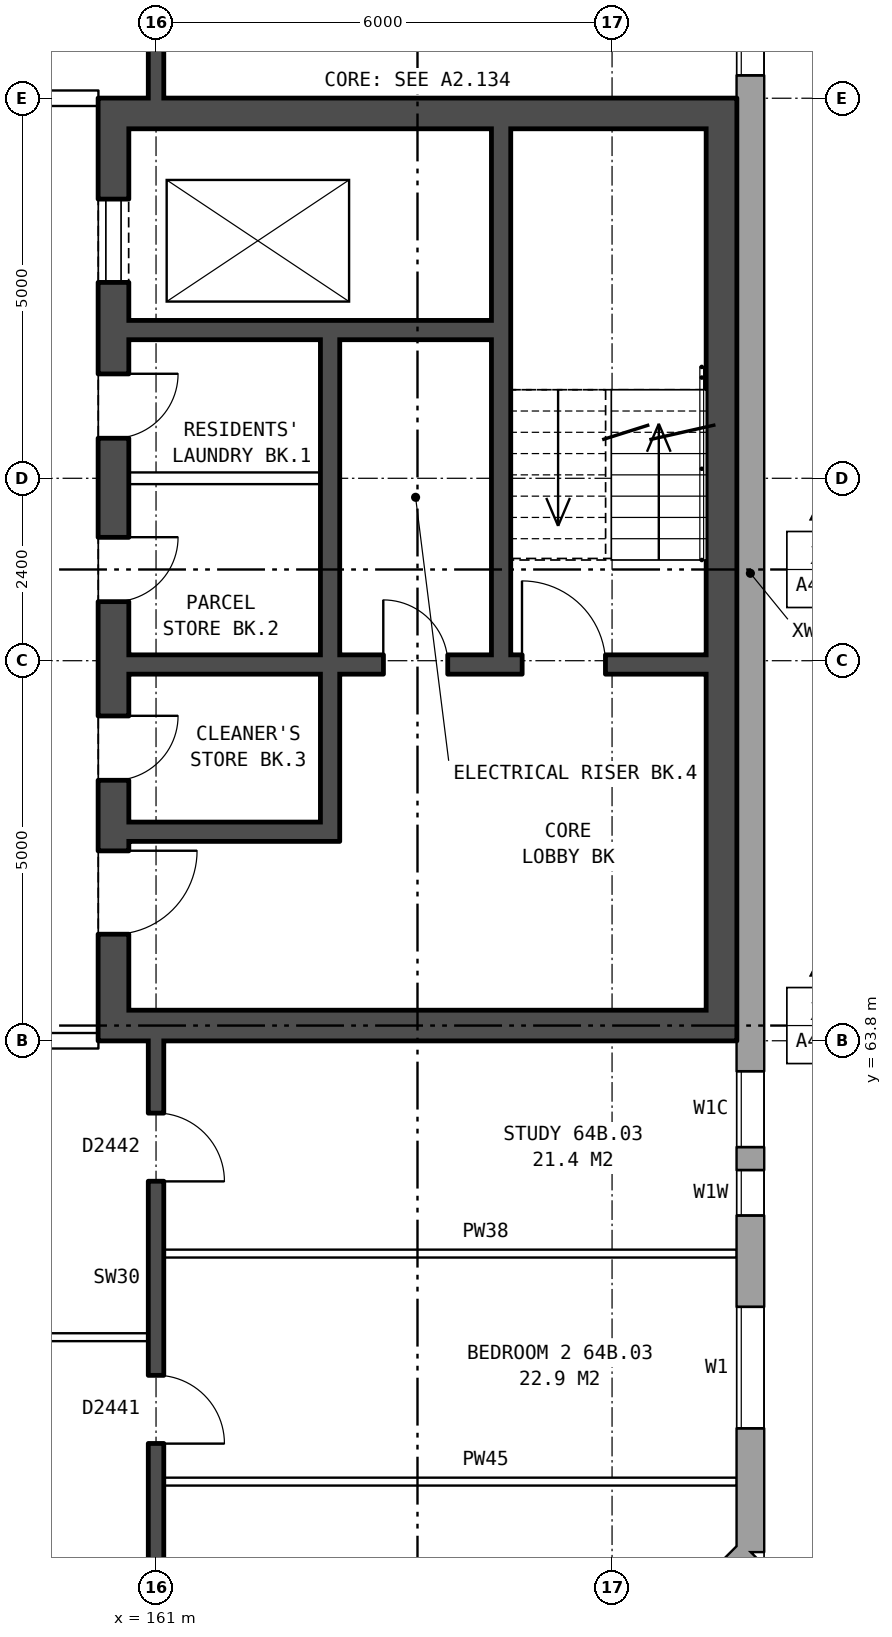
"""IFC4 building model, lengths in metres.
Left out: names, types, materials, properties, quantities, classifications, styles, units other than length and angle.
Written with IfcOpenShell. Run it as: python <this file> out.ifc"""

import sys

from ifc_helpers import new_model, si_unit, direction, frame, frame_2d, origin, place, context, subcontext, project, spatial, rectangle, extrude, element, fill, save


model = new_model("IFC4")
c1 = context("Model", 3, precision=1e-05, world=origin(), true_north=direction((0.0, 1.0)))
c2 = subcontext(c1, "Body", "Model", "MODEL_VIEW")
j1 = project(units=[si_unit("LENGTHUNIT", "METRE"), si_unit("PLANEANGLEUNIT", "RADIAN")], contexts=[c1])
p1 = place(None, origin())
s1 = spatial("IfcSite", under=j1, at=p1, CompositionType="ELEMENT")
p2 = place(p1, origin())
s2 = spatial("IfcBuilding", under=s1, at=p2, CompositionType="ELEMENT")
p3 = place(p2, frame((0.0, 0.0, 227.6)))
s3 = spatial("IfcBuildingStorey", under=s2, at=p3, CompositionType="ELEMENT", Elevation=227.6)
p4 = place(p3, frame((165.925, 54.18, 0.0), z_axis=(0.0, 0.0, 1.0), x_axis=(0.707106781187, 0.707106781187, 0.0)))
e1 = element("IfcWall", 1, at=p4, inside=s3, PredefinedType="STANDARD", context=c2, shape_type="SweptSolid", body=[
    extrude(rectangle(XDim=4.094, YDim=0.36, at=frame_2d((2.047, 0.0))), origin(), (0.0, 0.0, 1.0), 2.85),
])
p5 = place(p4, frame((1.247, 0.0, 0.8)))
e2 = element("IfcOpeningElement", 2, at=p5, cuts=e1, PredefinedType="OPENING", context=c2, shape_type="SweptSolid", body=[
    extrude(rectangle(XDim=1.6, YDim=1.8, at=frame_2d((0.8, 0.9))), frame((0.0, 0.19, 0.0), z_axis=(0.0, -1.0, 0.0), x_axis=(1.0, 0.0, 0.0)), (0.0, 0.0, 1.0), 0.38),
])
p6 = place(p3, frame((168.82, 57.075, 0.0), z_axis=(0.0, 0.0, 1.0), x_axis=(0.0, 1.0, 0.0)))
e3 = element("IfcWall", 3, at=p6, inside=s3, PredefinedType="STANDARD", context=c2, shape_type="SweptSolid", body=[
    extrude(rectangle(XDim=25.851, YDim=0.36, at=frame_2d((12.925, 0.0))), origin(), (0.0, 0.0, 1.0), 2.85),
])
p7 = place(p6, frame((1.625, 0.0, 0.8)))
e4 = element("IfcOpeningElement", 4, at=p7, cuts=e3, PredefinedType="OPENING", context=c2, shape_type="SweptSolid", body=[
    extrude(rectangle(XDim=1.6, YDim=1.8, at=frame_2d((0.8, 0.9))), frame((0.0, 0.19, 0.0), z_axis=(0.0, -1.0, 0.0), x_axis=(1.0, 0.0, 0.0)), (0.0, 0.0, 1.0), 0.38),
])
p8 = place(p6, frame((4.425, 0.0, 1.7)))
e5 = element("IfcOpeningElement", 5, at=p8, cuts=e3, PredefinedType="OPENING", context=c2, shape_type="SweptSolid", body=[
    extrude(rectangle(XDim=0.6, YDim=0.9, at=frame_2d((0.3, 0.45))), frame((0.0, 0.19, 0.0), z_axis=(0.0, -1.0, 0.0), x_axis=(1.0, 0.0, 0.0)), (0.0, 0.0, 1.0), 0.38),
])
p9 = place(p6, frame((19.425, 0.0, 0.8)))
e6 = element("IfcOpeningElement", 6, at=p9, cuts=e3, PredefinedType="OPENING", context=c2, shape_type="SweptSolid", body=[
    extrude(rectangle(XDim=1.0, YDim=1.8, at=frame_2d((0.5, 0.9))), frame((0.0, 0.19, 0.0), z_axis=(0.0, -1.0, 0.0), x_axis=(1.0, 0.0, 0.0)), (0.0, 0.0, 1.0), 0.38),
])
p10 = place(p6, frame((22.625, 0.0, 0.8)))
e7 = element("IfcOpeningElement", 7, at=p10, cuts=e3, PredefinedType="OPENING", context=c2, shape_type="SweptSolid", body=[
    extrude(rectangle(XDim=1.6, YDim=1.8, at=frame_2d((0.8, 0.9))), frame((0.0, 0.19, 0.0), z_axis=(0.0, -1.0, 0.0), x_axis=(1.0, 0.0, 0.0)), (0.0, 0.0, 1.0), 0.38),
])
p11 = place(p6, frame((5.325, 0.0, 0.8)))
e8 = element("IfcOpeningElement", 8, at=p11, cuts=e3, PredefinedType="OPENING", context=c2, shape_type="SweptSolid", body=[
    extrude(rectangle(XDim=1.0, YDim=1.8, at=frame_2d((0.5, 0.9))), frame((0.0, 0.19, 0.0), z_axis=(0.0, -1.0, 0.0), x_axis=(1.0, 0.0, 0.0)), (0.0, 0.0, 1.0), 0.38),
])
p12 = place(p6, frame((20.725, 0.0, 1.6)))
e9 = element("IfcOpeningElement", 9, at=p12, cuts=e3, PredefinedType="OPENING", context=c2, shape_type="SweptSolid", body=[
    extrude(rectangle(XDim=0.6, YDim=0.9, at=frame_2d((0.3, 0.45))), frame((0.0, 0.19, 0.0), z_axis=(0.0, -1.0, 0.0), x_axis=(1.0, 0.0, 0.0)), (0.0, 0.0, 1.0), 0.38),
])
p13 = place(p3, frame((160.44, 76.2, 0.0), z_axis=(0.0, 0.0, 1.0), x_axis=(0.0, -1.0, 0.0)))
e10 = element("IfcWall", 10, at=p13, inside=s3, PredefinedType="SHEAR", context=c2, shape_type="SweptSolid", body=[
    extrude(rectangle(XDim=12.4, YDim=0.4, at=frame_2d((6.2, 0.0))), origin(), (0.0, 0.0, 1.0), 2.85),
])
p14 = place(p13, frame((1.325, 0.0, 0.0)))
e11 = element("IfcOpeningElement", 11, at=p14, cuts=e10, PredefinedType="OPENING", context=c2, shape_type="SweptSolid", body=[
    extrude(rectangle(XDim=1.1, YDim=2.1, at=frame_2d((0.55, 1.05))), frame((0.0, 0.21, 0.0), z_axis=(0.0, -1.0, 0.0), x_axis=(1.0, 0.0, 0.0)), (0.0, 0.0, 1.0), 0.42),
])
p15 = place(p13, frame((3.625, 0.0, 0.0)))
e12 = element("IfcOpeningElement", 12, at=p15, cuts=e10, PredefinedType="OPENING", context=c2, shape_type="SweptSolid", body=[
    extrude(rectangle(XDim=0.85, YDim=2.1, at=frame_2d((0.425, 1.05))), frame((0.0, 0.21, 0.0), z_axis=(0.0, -1.0, 0.0), x_axis=(1.0, 0.0, 0.0)), (0.0, 0.0, 1.0), 0.42),
])
p16 = place(p13, frame((5.775, 0.0, 0.0)))
e13 = element("IfcOpeningElement", 13, at=p16, cuts=e10, PredefinedType="OPENING", context=c2, shape_type="SweptSolid", body=[
    extrude(rectangle(XDim=0.85, YDim=2.1, at=frame_2d((0.425, 1.05))), frame((0.0, 0.21, 0.0), z_axis=(0.0, -1.0, 0.0), x_axis=(1.0, 0.0, 0.0)), (0.0, 0.0, 1.0), 0.42),
])
p17 = place(p13, frame((9.9, 0.0, 0.0)))
e14 = element("IfcOpeningElement", 14, at=p17, cuts=e10, PredefinedType="OPENING", context=c2, shape_type="SweptSolid", body=[
    extrude(rectangle(XDim=1.1, YDim=2.1, at=frame_2d((0.55, 1.05))), frame((0.0, 0.21, 0.0), z_axis=(0.0, -1.0, 0.0), x_axis=(1.0, 0.0, 0.0)), (0.0, 0.0, 1.0), 0.42),
])
p18 = place(p13, frame((8.125, 0.0, 0.0)))
e15 = element("IfcOpeningElement", 15, at=p18, cuts=e10, PredefinedType="OPENING", context=c2, shape_type="SweptSolid", body=[
    extrude(rectangle(XDim=0.85, YDim=2.1, at=frame_2d((0.425, 1.05))), frame((0.0, 0.21, 0.0), z_axis=(0.0, -1.0, 0.0), x_axis=(1.0, 0.0, 0.0)), (0.0, 0.0, 1.0), 0.42),
])
p19 = place(p3, frame((168.44, 76.2, 0.0), z_axis=(0.0, 0.0, 1.0), x_axis=(0.0, -1.0, 0.0)))
e16 = element("IfcWall", 16, at=p19, inside=s3, PredefinedType="SHEAR", context=c2, shape_type="SweptSolid", body=[
    extrude(rectangle(XDim=12.4, YDim=0.4, at=frame_2d((6.2, 0.0))), origin(), (0.0, 0.0, 1.0), 2.85),
])
for number, where, z_axis, x_axis in (
    (17, (160.64, 76.0, 0.0), (0.0, 0.0, 1.0), (1.0, 0.0, 0.0)),
    (18, (160.64, 64.0, 0.0), (0.0, 0.0, 1.0), (1.0, 0.0, 0.0)),
):
    element("IfcWall", number, at=place(p3, frame(where, z_axis=z_axis, x_axis=x_axis)), inside=s3, PredefinedType="SHEAR", context=c2, shape_type="SweptSolid", body=[
        extrude(rectangle(XDim=7.6, YDim=0.4, at=frame_2d((3.8, 0.0))), origin(), (0.0, 0.0, 1.0), 2.85),
    ])
p20 = place(p3, frame((160.64, 73.15, 0.0), z_axis=(0.0, 0.0, 1.0), x_axis=(1.0, 0.0, 0.0)))
e19 = element("IfcWall", 19, at=p20, inside=s3, PredefinedType="SHEAR", context=c2, shape_type="SweptSolid", body=[
    extrude(rectangle(XDim=4.775, YDim=0.25, at=frame_2d((2.388, 0.0))), origin(), (0.0, 0.0, 1.0), 2.85),
])
p21 = place(p3, frame((160.64, 71.2, 0.0), z_axis=(0.0, 0.0, 1.0), x_axis=(1.0, 0.0, 0.0)))
e20 = element("IfcWall", 20, at=p21, inside=s3, PredefinedType="PARTITIONING", context=c2, shape_type="SweptSolid", body=[
    extrude(rectangle(XDim=2.525, YDim=0.15, at=frame_2d((1.263, 0.0))), origin(), (0.0, 0.0, 1.0), 2.85),
])
p22 = place(p3, frame((160.64, 68.75, 0.0), z_axis=(0.0, 0.0, 1.0), x_axis=(1.0, 0.0, 0.0)))
e21 = element("IfcWall", 21, at=p22, inside=s3, PredefinedType="SHEAR", context=c2, shape_type="SweptSolid", body=[
    extrude(rectangle(XDim=7.6, YDim=0.25, at=frame_2d((3.8, 0.0))), origin(), (0.0, 0.0, 1.0), 2.85),
])
p23 = place(p22, frame((5.175, 0.0, 0.0)))
e22 = element("IfcOpeningElement", 22, at=p23, cuts=e21, PredefinedType="OPENING", context=c2, shape_type="SweptSolid", body=[
    extrude(rectangle(XDim=1.1, YDim=2.1, at=frame_2d((0.55, 1.05))), frame((0.0, 0.135, 0.0), z_axis=(0.0, -1.0, 0.0), x_axis=(1.0, 0.0, 0.0)), (0.0, 0.0, 1.0), 0.27),
])
p24 = place(p22, frame((3.35, 0.0, 0.0)))
e23 = element("IfcOpeningElement", 23, at=p24, cuts=e21, PredefinedType="OPENING", context=c2, shape_type="SweptSolid", body=[
    extrude(rectangle(XDim=0.85, YDim=2.1, at=frame_2d((0.425, 1.05))), frame((0.0, 0.135, 0.0), z_axis=(0.0, -1.0, 0.0), x_axis=(1.0, 0.0, 0.0)), (0.0, 0.0, 1.0), 0.27),
])
p25 = place(p3, frame((160.64, 66.55, 0.0), z_axis=(0.0, 0.0, 1.0), x_axis=(1.0, 0.0, 0.0)))
e24 = element("IfcWall", 24, at=p25, inside=s3, PredefinedType="SHEAR", context=c2, shape_type="SweptSolid", body=[
    extrude(rectangle(XDim=2.525, YDim=0.25, at=frame_2d((1.263, 0.0))), origin(), (0.0, 0.0, 1.0), 2.85),
])
p26 = place(p3, frame((163.29, 73.025, 0.0), z_axis=(0.0, 0.0, 1.0), x_axis=(0.0, -1.0, 0.0)))
e25 = element("IfcWall", 25, at=p26, inside=s3, PredefinedType="SHEAR", context=c2, shape_type="SweptSolid", body=[
    extrude(rectangle(XDim=4.15, YDim=0.25, at=frame_2d((2.075, 0.0))), origin(), (0.0, 0.0, 1.0), 2.85),
])
p27 = place(p3, frame((163.29, 68.625, 0.0), z_axis=(0.0, 0.0, 1.0), x_axis=(0.0, -1.0, 0.0)))
e26 = element("IfcWall", 26, at=p27, inside=s3, PredefinedType="SHEAR", context=c2, shape_type="SweptSolid", body=[
    extrude(rectangle(XDim=2.2, YDim=0.25, at=frame_2d((1.1, 0.0))), origin(), (0.0, 0.0, 1.0), 2.85),
])
p28 = place(p3, frame((165.54, 75.8, 0.0), z_axis=(0.0, 0.0, 1.0), x_axis=(0.0, -1.0, 0.0)))
e27 = element("IfcWall", 27, at=p28, inside=s3, PredefinedType="SHEAR", context=c2, shape_type="SweptSolid", body=[
    extrude(rectangle(XDim=6.925, YDim=0.25, at=frame_2d((3.462, 0.0))), origin(), (0.0, 0.0, 1.0), 2.85),
])
p29 = place(p3, frame((161.1, 58.0, 0.0), z_axis=(0.0, 0.0, 1.0), x_axis=(1.0, 0.0, 0.0)))
e28 = element("IfcWall", 28, at=p29, inside=s3, PredefinedType="PARTITIONING", context=c2, shape_type="SweptSolid", body=[
    extrude(rectangle(XDim=7.54, YDim=0.1, at=frame_2d((3.77, 0.0))), origin(), (0.0, 0.0, 1.0), 2.85),
])
p30 = place(p3, frame((155.1, 59.9, 0.0), z_axis=(0.0, 0.0, 1.0), x_axis=(1.0, 0.0, 0.0)))
e29 = element("IfcWall", 29, at=p30, inside=s3, PredefinedType="PARTITIONING", context=c2, shape_type="SweptSolid", body=[
    extrude(rectangle(XDim=5.8, YDim=0.1, at=frame_2d((2.9, 0.0))), origin(), (0.0, 0.0, 1.0), 2.85),
])
p31 = place(p30, frame((3.6, 0.0, 0.0)))
e30 = element("IfcOpeningElement", 30, at=p31, cuts=e29, PredefinedType="OPENING", context=c2, shape_type="SweptSolid", body=[
    extrude(rectangle(XDim=0.9, YDim=2.1, at=frame_2d((0.45, 1.05))), frame((0.0, 0.06, 0.0), z_axis=(0.0, -1.0, 0.0), x_axis=(1.0, 0.0, 0.0)), (0.0, 0.0, 1.0), 0.12),
])
p32 = place(p30, frame((0.7, 0.0, 0.0)))
e31 = element("IfcOpeningElement", 31, at=p32, cuts=e29, PredefinedType="OPENING", context=c2, shape_type="SweptSolid", body=[
    extrude(rectangle(XDim=0.9, YDim=2.1, at=frame_2d((0.45, 1.05))), frame((0.0, 0.06, 0.0), z_axis=(0.0, -1.0, 0.0), x_axis=(1.0, 0.0, 0.0)), (0.0, 0.0, 1.0), 0.12),
])
p33 = place(p3, frame((161.1, 61.0, 0.0), z_axis=(0.0, 0.0, 1.0), x_axis=(1.0, 0.0, 0.0)))
e32 = element("IfcWall", 32, at=p33, inside=s3, PredefinedType="PARTITIONING", context=c2, shape_type="SweptSolid", body=[
    extrude(rectangle(XDim=7.54, YDim=0.1, at=frame_2d((3.77, 0.0))), origin(), (0.0, 0.0, 1.0), 2.85),
])
p34 = place(p3, frame((157.24, 63.8, 0.0), z_axis=(0.0, 0.0, 1.0), x_axis=(1.0, 0.0, 0.0)))
e33 = element("IfcWall", 33, at=p34, inside=s3, PredefinedType="PARTITIONING", context=c2, shape_type="SweptSolid", body=[
    extrude(rectangle(XDim=3.0, YDim=0.2, at=frame_2d((1.5, 0.0))), origin(), (0.0, 0.0, 1.0), 2.85),
])
p35 = place(p34, frame((1.0, 0.0, 0.0)))
e34 = element("IfcOpeningElement", 34, at=p35, cuts=e33, PredefinedType="OPENING", context=c2, shape_type="SweptSolid", body=[
    extrude(rectangle(XDim=1.0, YDim=2.1, at=frame_2d((0.5, 1.05))), frame((0.0, 0.11, 0.0), z_axis=(0.0, -1.0, 0.0), x_axis=(1.0, 0.0, 0.0)), (0.0, 0.0, 1.0), 0.22),
])
p36 = place(p3, frame((157.24, 76.2, 0.0), z_axis=(0.0, 0.0, 1.0), x_axis=(1.0, 0.0, 0.0)))
e35 = element("IfcWall", 35, at=p36, inside=s3, PredefinedType="PARTITIONING", context=c2, shape_type="SweptSolid", body=[
    extrude(rectangle(XDim=3.0, YDim=0.2, at=frame_2d((1.5, 0.0))), origin(), (0.0, 0.0, 1.0), 2.85),
])
p37 = place(p36, frame((1.0, 0.0, 0.0)))
e36 = element("IfcOpeningElement", 36, at=p37, cuts=e35, PredefinedType="OPENING", context=c2, shape_type="SweptSolid", body=[
    extrude(rectangle(XDim=1.0, YDim=2.1, at=frame_2d((0.5, 1.05))), frame((0.0, 0.11, 0.0), z_axis=(0.0, -1.0, 0.0), x_axis=(1.0, 0.0, 0.0)), (0.0, 0.0, 1.0), 0.22),
])
p38 = place(p3, frame((161.0, 54.36, 0.0), z_axis=(0.0, 0.0, 1.0), x_axis=(0.0, 1.0, 0.0)))
e37 = element("IfcWall", 37, at=p38, inside=s3, PredefinedType="SOLIDWALL", context=c2, shape_type="SweptSolid", body=[
    extrude(rectangle(XDim=9.44, YDim=0.2, at=frame_2d((4.72, 0.0))), origin(), (0.0, 0.0, 1.0), 2.85),
])
p39 = place(p38, frame((1.37, 0.0, 0.0)))
e38 = element("IfcOpeningElement", 38, at=p39, cuts=e37, PredefinedType="OPENING", context=c2, shape_type="SweptSolid", body=[
    extrude(rectangle(XDim=0.9, YDim=2.1, at=frame_2d((0.45, 1.05))), frame((0.0, 0.11, 0.0), z_axis=(0.0, -1.0, 0.0), x_axis=(1.0, 0.0, 0.0)), (0.0, 0.0, 1.0), 0.22),
])
p40 = place(p38, frame((4.14, 0.0, 0.0)))
e39 = element("IfcOpeningElement", 39, at=p40, cuts=e37, PredefinedType="OPENING", context=c2, shape_type="SweptSolid", body=[
    extrude(rectangle(XDim=0.9, YDim=2.1, at=frame_2d((0.45, 1.05))), frame((0.0, 0.11, 0.0), z_axis=(0.0, -1.0, 0.0), x_axis=(1.0, 0.0, 0.0)), (0.0, 0.0, 1.0), 0.22),
])
p41 = place(p38, frame((7.59, 0.0, 0.0)))
e40 = element("IfcOpeningElement", 40, at=p41, cuts=e37, PredefinedType="OPENING", context=c2, shape_type="SweptSolid", body=[
    extrude(rectangle(XDim=0.9, YDim=2.1, at=frame_2d((0.45, 1.05))), frame((0.0, 0.11, 0.0), z_axis=(0.0, -1.0, 0.0), x_axis=(1.0, 0.0, 0.0)), (0.0, 0.0, 1.0), 0.22),
])
p42 = place(p3, frame((161.0, 76.2, 0.0), z_axis=(0.0, 0.0, 1.0), x_axis=(0.0, 1.0, 0.0)))
e41 = element("IfcWall", 41, at=p42, inside=s3, PredefinedType="SOLIDWALL", context=c2, shape_type="SweptSolid", body=[
    extrude(rectangle(XDim=9.44, YDim=0.2, at=frame_2d((4.72, 0.0))), origin(), (0.0, 0.0, 1.0), 2.85),
])
p43 = place(p42, frame((7.17, 0.0, 0.0)))
e42 = element("IfcOpeningElement", 42, at=p43, cuts=e41, PredefinedType="OPENING", context=c2, shape_type="SweptSolid", body=[
    extrude(rectangle(XDim=0.9, YDim=2.1, at=frame_2d((0.45, 1.05))), frame((0.0, 0.11, 0.0), z_axis=(0.0, -1.0, 0.0), x_axis=(1.0, 0.0, 0.0)), (0.0, 0.0, 1.0), 0.22),
])
p44 = place(p42, frame((4.1, 0.0, 0.0)))
e43 = element("IfcOpeningElement", 43, at=p44, cuts=e41, PredefinedType="OPENING", context=c2, shape_type="SweptSolid", body=[
    extrude(rectangle(XDim=0.9, YDim=2.1, at=frame_2d((0.45, 1.05))), frame((0.0, 0.11, 0.0), z_axis=(0.0, -1.0, 0.0), x_axis=(1.0, 0.0, 0.0)), (0.0, 0.0, 1.0), 0.22),
])
p45 = place(p42, frame((0.95, 0.0, 0.0)))
e44 = element("IfcOpeningElement", 44, at=p45, cuts=e41, PredefinedType="OPENING", context=c2, shape_type="SweptSolid", body=[
    extrude(rectangle(XDim=0.9, YDim=2.1, at=frame_2d((0.45, 1.05))), frame((0.0, 0.11, 0.0), z_axis=(0.0, -1.0, 0.0), x_axis=(1.0, 0.0, 0.0)), (0.0, 0.0, 1.0), 0.22),
])
p46 = place(p7, origin())
e45 = element("IfcWindow", 45, at=p46, inside=s3, PartitioningType="SINGLE_PANEL", PredefinedType="WINDOW", context=c2, shape_type="SweptSolid", body=[
    extrude(rectangle(XDim=1.6, YDim=1.8, at=frame_2d((0.8, 0.9))), frame((0.0, 0.15, 0.0), z_axis=(0.0, -1.0, 0.0), x_axis=(1.0, 0.0, 0.0)), (0.0, 0.0, 1.0), 0.06),
])
fill(e4, e45)
p47 = place(p8, origin())
e46 = element("IfcWindow", 46, at=p47, inside=s3, PartitioningType="SINGLE_PANEL", PredefinedType="WINDOW", context=c2, shape_type="SweptSolid", body=[
    extrude(rectangle(XDim=0.6, YDim=0.9, at=frame_2d((0.3, 0.45))), frame((0.0, 0.15, 0.0), z_axis=(0.0, -1.0, 0.0), x_axis=(1.0, 0.0, 0.0)), (0.0, 0.0, 1.0), 0.06),
])
fill(e5, e46)
p48 = place(p9, origin())
e47 = element("IfcWindow", 47, at=p48, inside=s3, PartitioningType="SINGLE_PANEL", PredefinedType="WINDOW", context=c2, shape_type="SweptSolid", body=[
    extrude(rectangle(XDim=1.0, YDim=1.8, at=frame_2d((0.5, 0.9))), frame((0.0, 0.15, 0.0), z_axis=(0.0, -1.0, 0.0), x_axis=(1.0, 0.0, 0.0)), (0.0, 0.0, 1.0), 0.06),
])
fill(e6, e47)
p49 = place(p14, origin())
e48 = element("IfcDoor", 48, at=p49, inside=s3, OperationType="DOUBLE_DOOR_SLIDING", PredefinedType="DOOR", context=c2, shape_type="SweptSolid", body=[
    extrude(rectangle(XDim=1.1, YDim=2.1, at=frame_2d((0.55, 1.05))), frame((0.0, 0.185, 0.0), z_axis=(0.0, -1.0, 0.0), x_axis=(1.0, 0.0, 0.0)), (0.0, 0.0, 1.0), 0.05),
])
fill(e11, e48)
p50 = place(p15, origin())
e49 = element("IfcDoor", 49, at=p50, inside=s3, OperationType="SINGLE_SWING_LEFT", PredefinedType="DOOR", context=c2, shape_type="SweptSolid", body=[
    extrude(rectangle(XDim=0.85, YDim=2.1, at=frame_2d((0.425, 1.05))), frame((0.0, 0.185, 0.0), z_axis=(0.0, -1.0, 0.0), x_axis=(1.0, 0.0, 0.0)), (0.0, 0.0, 1.0), 0.05),
])
fill(e12, e49)
p51 = place(p16, origin())
e50 = element("IfcDoor", 50, at=p51, inside=s3, OperationType="SINGLE_SWING_LEFT", PredefinedType="DOOR", context=c2, shape_type="SweptSolid", body=[
    extrude(rectangle(XDim=0.85, YDim=2.1, at=frame_2d((0.425, 1.05))), frame((0.0, 0.185, 0.0), z_axis=(0.0, -1.0, 0.0), x_axis=(1.0, 0.0, 0.0)), (0.0, 0.0, 1.0), 0.05),
])
fill(e13, e50)
p52 = place(p17, origin())
e51 = element("IfcDoor", 51, at=p52, inside=s3, OperationType="SINGLE_SWING_LEFT", PredefinedType="DOOR", context=c2, shape_type="SweptSolid", body=[
    extrude(rectangle(XDim=1.1, YDim=2.1, at=frame_2d((0.55, 1.05))), frame((0.0, 0.185, 0.0), z_axis=(0.0, -1.0, 0.0), x_axis=(1.0, 0.0, 0.0)), (0.0, 0.0, 1.0), 0.05),
])
fill(e14, e51)
p53 = place(p23, origin())
e52 = element("IfcDoor", 52, at=p53, inside=s3, OperationType="SINGLE_SWING_LEFT", PredefinedType="DOOR", context=c2, shape_type="SweptSolid", body=[
    extrude(rectangle(XDim=1.1, YDim=2.1, at=frame_2d((0.55, 1.05))), frame((0.0, 0.025, 0.0), z_axis=(0.0, -1.0, 0.0), x_axis=(1.0, 0.0, 0.0)), (0.0, 0.0, 1.0), 0.05),
])
fill(e22, e52)
p54 = place(p18, origin())
e53 = element("IfcDoor", 53, at=p54, inside=s3, OperationType="SINGLE_SWING_LEFT", PredefinedType="DOOR", context=c2, shape_type="SweptSolid", body=[
    extrude(rectangle(XDim=0.85, YDim=2.1, at=frame_2d((0.425, 1.05))), frame((0.0, 0.185, 0.0), z_axis=(0.0, -1.0, 0.0), x_axis=(1.0, 0.0, 0.0)), (0.0, 0.0, 1.0), 0.05),
])
fill(e15, e53)
p55 = place(p24, origin())
e54 = element("IfcDoor", 54, at=p55, inside=s3, OperationType="SINGLE_SWING_LEFT", PredefinedType="DOOR", context=c2, shape_type="SweptSolid", body=[
    extrude(rectangle(XDim=0.85, YDim=2.1, at=frame_2d((0.425, 1.05))), frame((0.0, 0.025, 0.0), z_axis=(0.0, -1.0, 0.0), x_axis=(1.0, 0.0, 0.0)), (0.0, 0.0, 1.0), 0.05),
])
fill(e23, e54)
p56 = place(p40, frame((0.9, 0.0, 0.0), z_axis=(0.0, 0.0, 1.0), x_axis=(-1.0, 0.0, 0.0)))
e55 = element("IfcDoor", 55, at=p56, inside=s3, OperationType="SINGLE_SWING_RIGHT", PredefinedType="DOOR", context=c2, shape_type="SweptSolid", body=[
    extrude(rectangle(XDim=0.9, YDim=2.1, at=frame_2d((0.45, 1.05))), frame((0.0, 0.025, 0.0), z_axis=(0.0, -1.0, 0.0), x_axis=(1.0, 0.0, 0.0)), (0.0, 0.0, 1.0), 0.05),
])
fill(e39, e55)
p57 = place(p41, frame((0.9, 0.0, 0.0), z_axis=(0.0, 0.0, 1.0), x_axis=(-1.0, 0.0, 0.0)))
e56 = element("IfcDoor", 56, at=p57, inside=s3, OperationType="SINGLE_SWING_RIGHT", PredefinedType="DOOR", context=c2, shape_type="SweptSolid", body=[
    extrude(rectangle(XDim=0.9, YDim=2.1, at=frame_2d((0.45, 1.05))), frame((0.0, 0.025, 0.0), z_axis=(0.0, -1.0, 0.0), x_axis=(1.0, 0.0, 0.0)), (0.0, 0.0, 1.0), 0.05),
])
fill(e40, e56)
p58 = place(p11, origin())
e57 = element("IfcWindow", 57, at=p58, inside=s3, PartitioningType="SINGLE_PANEL", PredefinedType="WINDOW", context=c2, shape_type="SweptSolid", body=[
    extrude(rectangle(XDim=1.0, YDim=1.8, at=frame_2d((0.5, 0.9))), frame((0.0, 0.15, 0.0), z_axis=(0.0, -1.0, 0.0), x_axis=(1.0, 0.0, 0.0)), (0.0, 0.0, 1.0), 0.06),
])
fill(e8, e57)
save(model, sys.argv[1])
